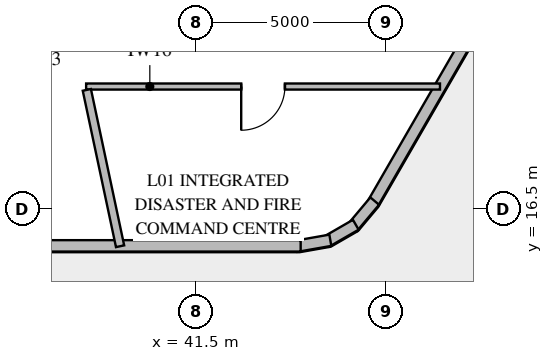
"""IFC4 building model, lengths in metres.
Left out: names, types, materials, properties, quantities, classifications, styles, units other than length and angle.
Written with IfcOpenShell. Run it as: python <this file> out.ifc"""

import sys

from ifc_helpers import new_model, si_unit, direction, frame, frame_2d, origin, place, context, subcontext, project, spatial, rectangle, extrude, element, fill, save


model = new_model("IFC4")
c1 = context("Model", 3, precision=1e-05, world=origin(), true_north=direction((0.0, 1.0)))
c2 = subcontext(c1, "Body", "Model", "MODEL_VIEW")
j1 = project(units=[si_unit("LENGTHUNIT", "METRE"), si_unit("PLANEANGLEUNIT", "RADIAN")], contexts=[c1])
p1 = place(None, origin())
s1 = spatial("IfcSite", under=j1, at=p1, CompositionType="ELEMENT")
p2 = place(p1, origin())
s2 = spatial("IfcBuilding", under=s1, at=p2, CompositionType="ELEMENT")
p3 = place(p2, origin())
s3 = spatial("IfcBuildingStorey", under=s2, at=p3, CompositionType="ELEMENT", Elevation=0.0)
p4 = place(p3, frame((54.398, 30.911, 0.0), z_axis=(0.0, 0.0, 1.0), x_axis=(-0.49999847728, -0.866026282926, 0.0)))
e1 = element("IfcWall", 1, at=p4, inside=s3, PredefinedType="SOLIDWALL", context=c2, shape_type="SweptSolid", body=[
    extrude(rectangle(XDim=16.512, YDim=0.3, at=frame_2d((8.256, 0.0))), origin(), (0.0, 0.0, 1.0), 5.95),
])
p5 = place(p4, frame((7.356, 0.0, 0.0)))
e2 = element("IfcOpeningElement", 2, at=p5, cuts=e1, PredefinedType="OPENING", context=c2, shape_type="SweptSolid", body=[
    extrude(rectangle(XDim=1.8, YDim=2.4, at=frame_2d((0.9, 1.2))), frame((0.0, 0.162, 0.0), z_axis=(0.0, -1.0, 0.0), x_axis=(1.0, 0.0, 0.0)), (0.0, 0.0, 1.0), 0.324),
])
p6 = place(p4, frame((7.056, 0.0, 4.5)))
e3 = element("IfcOpeningElement", 3, at=p6, cuts=e1, PredefinedType="OPENING", context=c2, shape_type="SweptSolid", body=[
    extrude(rectangle(XDim=2.4, YDim=1.6, at=frame_2d((1.2, 0.8))), frame((0.0, 0.162, 0.0), z_axis=(0.0, -1.0, 0.0), x_axis=(1.0, 0.0, 0.0)), (0.0, 0.0, 1.0), 0.324),
])
p7 = place(p3, frame((46.205, 16.701, 0.0), z_axis=(0.0, 0.0, 1.0), x_axis=(-0.64283728984, -0.766002753775, 0.0)))
e4 = element("IfcWall", 4, at=p7, inside=s3, PredefinedType="SOLIDWALL", context=c2, shape_type="SweptSolid", body=[
    extrude(rectangle(XDim=0.904, YDim=0.3, at=frame_2d((0.452, 0.0))), origin(), (0.0, 0.0, 1.0), 7.35),
])
p8 = place(p3, frame((45.707, 16.078, 0.0), z_axis=(0.0, 0.0, 1.0), x_axis=(-0.866007538022, -0.500030943131, 0.0)))
e5 = element("IfcWall", 5, at=p8, inside=s3, PredefinedType="SOLIDWALL", context=c2, shape_type="SweptSolid", body=[
    extrude(rectangle(XDim=0.891, YDim=0.3, at=frame_2d((0.445, 0.0))), origin(), (0.0, 0.0, 1.0), 7.35),
])
p9 = place(p3, frame((45.037, 15.67, 0.0), z_axis=(0.0, 0.0, 1.0), x_axis=(-0.984802587151, -0.173677472172, 0.0)))
e6 = element("IfcWall", 6, at=p9, inside=s3, PredefinedType="SOLIDWALL", context=c2, shape_type="SweptSolid", body=[
    extrude(rectangle(XDim=0.904, YDim=0.3, at=frame_2d((0.452, 0.0))), origin(), (0.0, 0.0, 1.0), 7.35),
])
p10 = place(p3, frame((44.256, 15.522, 0.0), z_axis=(0.0, 0.0, 1.0), x_axis=(-1.0, 0.0, 0.0)))
e7 = element("IfcWall", 7, at=p10, inside=s3, PredefinedType="SOLIDWALL", context=c2, shape_type="SweptSolid", body=[
    extrude(rectangle(XDim=16.513, YDim=0.3, at=frame_2d((8.256, 0.0))), origin(), (0.0, 0.0, 1.0), 5.95),
])
p11 = place(p10, frame((7.356, 0.0, 0.0)))
e8 = element("IfcOpeningElement", 8, at=p11, cuts=e7, PredefinedType="OPENING", context=c2, shape_type="SweptSolid", body=[
    extrude(rectangle(XDim=1.8, YDim=2.4, at=frame_2d((0.9, 1.2))), frame((0.0, 0.162, 0.0), z_axis=(0.0, -1.0, 0.0), x_axis=(1.0, 0.0, 0.0)), (0.0, 0.0, 1.0), 0.324),
])
p12 = place(p10, frame((7.056, 0.0, 4.5)))
e9 = element("IfcOpeningElement", 9, at=p12, cuts=e7, PredefinedType="OPENING", context=c2, shape_type="SweptSolid", body=[
    extrude(rectangle(XDim=2.4, YDim=1.6, at=frame_2d((1.2, 0.8))), frame((0.0, 0.162, 0.0), z_axis=(0.0, -1.0, 0.0), x_axis=(1.0, 0.0, 0.0)), (0.0, 0.0, 1.0), 0.324),
])
p13 = place(p3, frame((38.611, 19.715, 0.0), z_axis=(0.0, 0.0, 1.0), x_axis=(1.0, 0.0, 0.0)))
e10 = element("IfcWall", 10, at=p13, inside=s3, PredefinedType="PARTITIONING", context=c2, shape_type="SweptSolid", body=[
    extrude(rectangle(XDim=9.311, YDim=0.16, at=frame_2d((4.656, 0.0))), origin(), (0.0, 0.0, 1.0), 5.95),
])
p14 = place(p13, frame((4.081, 0.0, 0.0)))
e11 = element("IfcOpeningElement", 11, at=p14, cuts=e10, PredefinedType="OPENING", context=c2, shape_type="SweptSolid", body=[
    extrude(rectangle(XDim=1.15, YDim=2.2, at=frame_2d((0.575, 1.1))), frame((0.0, 0.092, 0.0), z_axis=(0.0, -1.0, 0.0), x_axis=(1.0, 0.0, 0.0)), (0.0, 0.0, 1.0), 0.184),
])
p15 = place(p3, frame((38.63, 19.627, 0.0), z_axis=(0.0, 0.0, 1.0), x_axis=(0.207943436246, -0.978140852496, 0.0)))
e12 = element("IfcWall", 12, at=p15, inside=s3, PredefinedType="PARTITIONING", context=c2, shape_type="SweptSolid", body=[
    extrude(rectangle(XDim=4.207, YDim=0.22, at=frame_2d((2.104, 0.0))), origin(), (0.0, 0.0, 1.0), 5.95),
])
p16 = place(p14, frame((1.15, 0.0, 0.0), z_axis=(0.0, 0.0, 1.0), x_axis=(-1.0, 0.0, 0.0)))
e13 = element("IfcDoor", 13, at=p16, inside=s3, OperationType="SINGLE_SWING_RIGHT", PredefinedType="DOOR", context=c2, shape_type="SweptSolid", body=[
    extrude(rectangle(XDim=1.15, YDim=2.2, at=frame_2d((0.575, 1.1))), frame((0.0, 0.025, 0.0), z_axis=(0.0, -1.0, 0.0), x_axis=(1.0, 0.0, 0.0)), (0.0, 0.0, 1.0), 0.05),
])
fill(e11, e13)
save(model, sys.argv[1])
